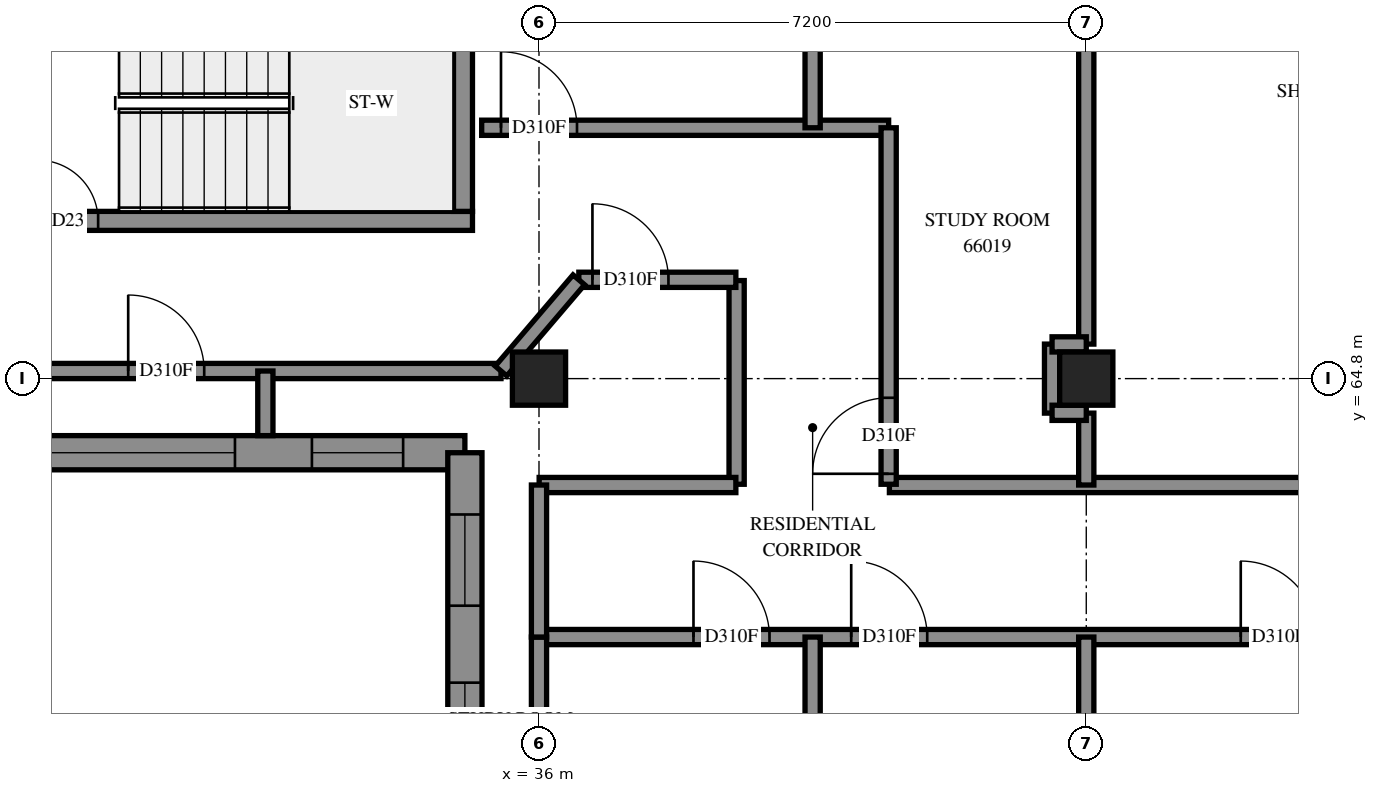
"""IFC4 building model, lengths in metres.
Left out: names, types, materials, properties, quantities, classifications, styles, units other than length and angle.
Written with IfcOpenShell. Run it as: python <this file> out.ifc"""

import sys

from ifc_helpers import new_model, si_unit, direction, frame, frame_2d, origin, origin_2d, place, context, subcontext, project, spatial, polyline, rectangle, outline, extrude, element, fill, save


model = new_model("IFC4")
c1 = context("Model", 3, precision=1e-05, world=origin(), true_north=direction((0.0, 1.0)))
c2 = subcontext(c1, "Body", "Model", "MODEL_VIEW")
j1 = project(units=[si_unit("LENGTHUNIT", "METRE"), si_unit("PLANEANGLEUNIT", "RADIAN")], contexts=[c1])
p1 = place(None, origin())
s1 = spatial("IfcSite", under=j1, at=p1, CompositionType="ELEMENT")
p2 = place(p1, origin())
s2 = spatial("IfcBuilding", under=s1, at=p2, CompositionType="ELEMENT")
p3 = place(p2, frame((0.0, 0.0, 243.8)))
s3 = spatial("IfcBuildingStorey", under=s2, at=p3, CompositionType="ELEMENT", Elevation=243.8)
for number, where, z_axis, x_axis in (
    (1, (36.0, 64.8, 0.0), (0.0, 0.0, 1.0), (1.0, 0.0, 0.0)),
    (2, (43.2, 64.8, 0.0), (0.0, 0.0, 1.0), (1.0, 0.0, 0.0)),
):
    element("IfcColumn", number, at=place(p3, frame(where, z_axis=z_axis, x_axis=x_axis)), inside=s3, PredefinedType="COLUMN", context=c2, shape_type="SweptSolid", body=[
        extrude(rectangle(XDim=0.7, YDim=0.7, at=origin_2d()), origin(), (0.0, 0.0, 1.0), 3.1),
    ])
p4 = place(p3, frame((26.925, 63.825, 0.0), z_axis=(0.0, 0.0, 1.0), x_axis=(1.0, 0.0, 0.0)))
e3 = element("IfcWall", 3, at=p4, inside=s3, PredefinedType="SOLIDWALL", context=c2, shape_type="SweptSolid", body=[
    extrude(outline(polyline([(-0.225, -0.225), (7.875, -0.225), (8.325, 0.225), (0.225, 0.225), (-0.225, -0.225)])), origin(), (0.0, 0.0, 1.0), 3.1),
])
p5 = place(p4, frame((2.275, 0.0, 0.45)))
e4 = element("IfcOpeningElement", 4, at=p5, cuts=e3, PredefinedType="OPENING", context=c2, shape_type="SweptSolid", body=[
    extrude(rectangle(XDim=2.8, YDim=2.55, at=frame_2d((1.4, 1.275))), frame((0.0, 0.235, 0.0), z_axis=(0.0, -1.0, 0.0), x_axis=(1.0, 0.0, 0.0)), (0.0, 0.0, 1.0), 0.47),
])
p6 = place(p4, frame((0.55, 0.0, 0.45)))
e5 = element("IfcOpeningElement", 5, at=p6, cuts=e3, PredefinedType="OPENING", context=c2, shape_type="SweptSolid", body=[
    extrude(rectangle(XDim=1.2, YDim=2.55, at=frame_2d((0.6, 1.275))), frame((0.0, 0.235, 0.0), z_axis=(0.0, -1.0, 0.0), x_axis=(1.0, 0.0, 0.0)), (0.0, 0.0, 1.0), 0.47),
])
p7 = place(p4, frame((6.088, 0.0, 0.45)))
e6 = element("IfcOpeningElement", 6, at=p7, cuts=e3, PredefinedType="OPENING", context=c2, shape_type="SweptSolid", body=[
    extrude(rectangle(XDim=1.2, YDim=2.55, at=frame_2d((0.6, 1.275))), frame((0.0, 0.235, 0.0), z_axis=(0.0, -1.0, 0.0), x_axis=(1.0, 0.0, 0.0)), (0.0, 0.0, 1.0), 0.47),
])
p8 = place(p3, frame((35.025, 63.825, 0.0), z_axis=(0.0, 0.0, 1.0), x_axis=(0.0, -1.0, 0.0)))
e7 = element("IfcWall", 7, at=p8, inside=s3, PredefinedType="SOLIDWALL", context=c2, shape_type="SweptSolid", body=[
    extrude(outline(polyline([(0.225, -0.225), (7.425, -0.225), (6.975, 0.225), (-0.225, 0.225), (0.225, -0.225)])), origin(), (0.0, 0.0, 1.0), 3.1),
])
p9 = place(p8, frame((3.025, 0.0, 0.45)))
e8 = element("IfcOpeningElement", 8, at=p9, cuts=e7, PredefinedType="OPENING", context=c2, shape_type="SweptSolid", body=[
    extrude(rectangle(XDim=2.8, YDim=2.55, at=frame_2d((1.4, 1.275))), frame((0.0, 0.235, 0.0), z_axis=(0.0, -1.0, 0.0), x_axis=(1.0, 0.0, 0.0)), (0.0, 0.0, 1.0), 0.47),
])
p10 = place(p8, frame((0.812, 0.0, 0.45)))
e9 = element("IfcOpeningElement", 9, at=p10, cuts=e7, PredefinedType="OPENING", context=c2, shape_type="SweptSolid", body=[
    extrude(rectangle(XDim=1.2, YDim=2.55, at=frame_2d((0.6, 1.275))), frame((0.0, 0.235, 0.0), z_axis=(0.0, -1.0, 0.0), x_axis=(1.0, 0.0, 0.0)), (0.0, 0.0, 1.0), 0.47),
])
p11 = place(p3, frame((28.875, 66.875, -0.3), z_axis=(0.0, 0.0, 1.0), x_axis=(1.0, 0.0, 0.0)))
e10 = element("IfcWall", 10, at=p11, inside=s3, PredefinedType="SOLIDWALL", context=c2, shape_type="SweptSolid", body=[
    extrude(rectangle(XDim=6.25, YDim=0.25, at=frame_2d((3.125, 0.0))), origin(), (0.0, 0.0, 1.0), 3.4),
])
p12 = place(p11, frame((0.525, 0.0, 0.3)))
e11 = element("IfcOpeningElement", 11, at=p12, cuts=e10, PredefinedType="OPENING", context=c2, shape_type="SweptSolid", body=[
    extrude(rectangle(XDim=0.8, YDim=2.1, at=frame_2d((0.4, 1.05))), frame((0.0, 0.135, 0.0), z_axis=(0.0, -1.0, 0.0), x_axis=(1.0, 0.0, 0.0)), (0.0, 0.0, 1.0), 0.27),
])
p13 = place(p3, frame((35.0, 67.0, -0.3), z_axis=(0.0, 0.0, 1.0), x_axis=(0.0, 1.0, 0.0)))
e12 = element("IfcWall", 12, at=p13, inside=s3, PredefinedType="SOLIDWALL", context=c2, shape_type="SweptSolid", body=[
    extrude(rectangle(XDim=2.85, YDim=0.25, at=frame_2d((1.425, 0.0))), origin(), (0.0, 0.0, 1.0), 3.4),
])
p14 = place(p3, frame((36.0, 61.4, 0.0), z_axis=(0.0, 0.0, 1.0), x_axis=(1.0, 0.0, 0.0)))
e13 = element("IfcWall", 13, at=p14, inside=s3, PredefinedType="PARTITIONING", context=c2, shape_type="SweptSolid", body=[
    extrude(rectangle(XDim=17.0, YDim=0.2, at=frame_2d((8.5, 0.0))), origin(), (0.0, 0.0, 1.0), 3.1),
])
p15 = place(p14, frame((2.033, 0.0, 0.0)))
e14 = element("IfcOpeningElement", 14, at=p15, cuts=e13, PredefinedType="OPENING", context=c2, shape_type="SweptSolid", body=[
    extrude(rectangle(XDim=1.0, YDim=2.1, at=frame_2d((0.5, 1.05))), frame((0.0, 0.11, 0.0), z_axis=(0.0, -1.0, 0.0), x_axis=(1.0, 0.0, 0.0)), (0.0, 0.0, 1.0), 0.22),
])
p16 = place(p14, frame((4.107, 0.0, 0.0)))
e15 = element("IfcOpeningElement", 15, at=p16, cuts=e13, PredefinedType="OPENING", context=c2, shape_type="SweptSolid", body=[
    extrude(rectangle(XDim=1.0, YDim=2.1, at=frame_2d((0.5, 1.05))), frame((0.0, 0.11, 0.0), z_axis=(0.0, -1.0, 0.0), x_axis=(1.0, 0.0, 0.0)), (0.0, 0.0, 1.0), 0.22),
])
p17 = place(p14, frame((9.232, 0.0, 0.0)))
e16 = element("IfcOpeningElement", 16, at=p17, cuts=e13, PredefinedType="OPENING", context=c2, shape_type="SweptSolid", body=[
    extrude(rectangle(XDim=1.0, YDim=2.1, at=frame_2d((0.5, 1.05))), frame((0.0, 0.11, 0.0), z_axis=(0.0, -1.0, 0.0), x_axis=(1.0, 0.0, 0.0)), (0.0, 0.0, 1.0), 0.22),
])
p18 = place(p14, frame((11.48, 0.0, 0.0)))
e17 = element("IfcOpeningElement", 17, at=p18, cuts=e13, PredefinedType="OPENING", context=c2, shape_type="SweptSolid", body=[
    extrude(rectangle(XDim=1.0, YDim=2.1, at=frame_2d((0.5, 1.05))), frame((0.0, 0.11, 0.0), z_axis=(0.0, -1.0, 0.0), x_axis=(1.0, 0.0, 0.0)), (0.0, 0.0, 1.0), 0.22),
])
p19 = place(p14, frame((15.805, 0.0, 0.0)))
e18 = element("IfcOpeningElement", 18, at=p19, cuts=e13, PredefinedType="OPENING", context=c2, shape_type="SweptSolid", body=[
    extrude(rectangle(XDim=1.0, YDim=2.1, at=frame_2d((0.5, 1.05))), frame((0.0, 0.11, 0.0), z_axis=(0.0, -1.0, 0.0), x_axis=(1.0, 0.0, 0.0)), (0.0, 0.0, 1.0), 0.22),
])
p20 = place(p3, frame((40.61, 63.4, 0.0), z_axis=(0.0, 0.0, 1.0), x_axis=(1.0, 0.0, 0.0)))
e19 = element("IfcWall", 19, at=p20, inside=s3, PredefinedType="PARTITIONING", context=c2, shape_type="SweptSolid", body=[
    extrude(rectangle(XDim=14.59, YDim=0.2, at=frame_2d((7.295, 0.0))), origin(), (0.0, 0.0, 1.0), 3.1),
])
p21 = place(p20, frame((6.3, 0.0, 0.0)))
e20 = element("IfcOpeningElement", 20, at=p21, cuts=e19, PredefinedType="OPENING", context=c2, shape_type="SweptSolid", body=[
    extrude(rectangle(XDim=1.0, YDim=2.1, at=frame_2d((0.5, 1.05))), frame((0.0, 0.11, 0.0), z_axis=(0.0, -1.0, 0.0), x_axis=(1.0, 0.0, 0.0)), (0.0, 0.0, 1.0), 0.22),
])
p22 = place(p20, frame((11.73, 0.0, 0.0)))
e21 = element("IfcOpeningElement", 21, at=p22, cuts=e19, PredefinedType="OPENING", context=c2, shape_type="SweptSolid", body=[
    extrude(rectangle(XDim=1.0, YDim=2.1, at=frame_2d((0.5, 1.05))), frame((0.0, 0.11, 0.0), z_axis=(0.0, -1.0, 0.0), x_axis=(1.0, 0.0, 0.0)), (0.0, 0.0, 1.0), 0.22),
])
p23 = place(p3, frame((29.15, 64.9, 0.0), z_axis=(0.0, 0.0, 1.0), x_axis=(1.0, 0.0, 0.0)))
e22 = element("IfcWall", 22, at=p23, inside=s3, PredefinedType="PARTITIONING", context=c2, shape_type="SweptSolid", body=[
    extrude(rectangle(XDim=6.35, YDim=0.2, at=frame_2d((3.175, 0.0))), origin(), (0.0, 0.0, 1.0), 2.6),
])
p24 = place(p23, frame((1.446, 0.0, 0.0)))
e23 = element("IfcOpeningElement", 23, at=p24, cuts=e22, PredefinedType="OPENING", context=c2, shape_type="SweptSolid", body=[
    extrude(rectangle(XDim=1.0, YDim=2.1, at=frame_2d((0.5, 1.05))), frame((0.0, 0.11, 0.0), z_axis=(0.0, -1.0, 0.0), x_axis=(1.0, 0.0, 0.0)), (0.0, 0.0, 1.0), 0.22),
])
p25 = place(p3, frame((43.2, 65.254, 0.0), z_axis=(0.0, 0.0, 1.0), x_axis=(0.0, 1.0, 0.0)))
e24 = element("IfcWall", 24, at=p25, inside=s3, PredefinedType="PARTITIONING", context=c2, shape_type="SweptSolid", body=[
    extrude(rectangle(XDim=6.292, YDim=0.2, at=frame_2d((3.146, 0.0))), origin(), (0.0, 0.0, 1.0), 3.1),
])
p26 = place(p3, frame((35.246, 68.1, 0.0), z_axis=(0.0, 0.0, 1.0), x_axis=(1.0, 0.0, 0.0)))
e25 = element("IfcWall", 25, at=p26, inside=s3, PredefinedType="PARTITIONING", context=c2, shape_type="SweptSolid", body=[
    extrude(rectangle(XDim=5.354, YDim=0.2, at=frame_2d((2.677, 0.0))), origin(), (0.0, 0.0, 1.0), 3.1),
])
p27 = place(p26, frame((0.254, 0.0, 0.0)))
e26 = element("IfcOpeningElement", 26, at=p27, cuts=e25, PredefinedType="OPENING", context=c2, shape_type="SweptSolid", body=[
    extrude(rectangle(XDim=1.0, YDim=2.1, at=frame_2d((0.5, 1.05))), frame((0.0, 0.11, 0.0), z_axis=(0.0, -1.0, 0.0), x_axis=(1.0, 0.0, 0.0)), (0.0, 0.0, 1.0), 0.22),
])
p28 = place(p3, frame((39.6, 68.1, 0.0), z_axis=(0.0, 0.0, 1.0), x_axis=(0.0, 1.0, 0.0)))
e27 = element("IfcWall", 27, at=p28, inside=s3, PredefinedType="PARTITIONING", context=c2, shape_type="SweptSolid", body=[
    extrude(rectangle(XDim=4.764, YDim=0.2, at=frame_2d((2.382, 0.0))), origin(), (0.0, 0.0, 1.0), 3.1),
])
p29 = place(p3, frame((40.6, 63.41, 0.0), z_axis=(0.0, 0.0, 1.0), x_axis=(0.0, 1.0, 0.0)))
e28 = element("IfcWall", 28, at=p29, inside=s3, PredefinedType="PARTITIONING", context=c2, shape_type="SweptSolid", body=[
    extrude(rectangle(XDim=4.69, YDim=0.2, at=frame_2d((2.345, 0.0))), origin(), (0.0, 0.0, 1.0), 3.1),
])
p30 = place(p29, frame((0.138, 0.0, 0.0)))
e29 = element("IfcOpeningElement", 29, at=p30, cuts=e28, PredefinedType="OPENING", context=c2, shape_type="SweptSolid", body=[
    extrude(rectangle(XDim=1.0, YDim=2.1, at=frame_2d((0.5, 1.05))), frame((0.0, 0.11, 0.0), z_axis=(0.0, -1.0, 0.0), x_axis=(1.0, 0.0, 0.0)), (0.0, 0.0, 1.0), 0.22),
])
p31 = place(p3, frame((39.6, 56.85, 0.0), z_axis=(0.0, 0.0, 1.0), x_axis=(0.0, 1.0, 0.0)))
e30 = element("IfcWall", 30, at=p31, inside=s3, PredefinedType="PARTITIONING", context=c2, shape_type="SweptSolid", body=[
    extrude(rectangle(XDim=4.55, YDim=0.2, at=frame_2d((2.275, 0.0))), origin(), (0.0, 0.0, 1.0), 3.1),
])
p32 = place(p3, frame((36.0, 57.95, 0.0), z_axis=(0.0, 0.0, 1.0), x_axis=(0.0, 1.0, 0.0)))
e31 = element("IfcWall", 31, at=p32, inside=s3, PredefinedType="PARTITIONING", context=c2, shape_type="SweptSolid", body=[
    extrude(rectangle(XDim=3.45, YDim=0.2, at=frame_2d((1.725, 0.0))), origin(), (0.0, 0.0, 1.0), 2.6),
])
p33 = place(p3, frame((43.2, 57.95, 0.0), z_axis=(0.0, 0.0, 1.0), x_axis=(0.0, 1.0, 0.0)))
e32 = element("IfcWall", 32, at=p33, inside=s3, PredefinedType="PARTITIONING", context=c2, shape_type="SweptSolid", body=[
    extrude(rectangle(XDim=3.45, YDim=0.2, at=frame_2d((1.725, 0.0))), origin(), (0.0, 0.0, 1.0), 3.1),
])
p34 = place(p3, frame((38.6, 63.41, 0.0), z_axis=(0.0, 0.0, 1.0), x_axis=(0.0, 1.0, 0.0)))
e33 = element("IfcWall", 33, at=p34, inside=s3, PredefinedType="PARTITIONING", context=c2, shape_type="SweptSolid", body=[
    extrude(rectangle(XDim=2.68, YDim=0.2, at=frame_2d((1.34, 0.0))), origin(), (0.0, 0.0, 1.0), 3.1),
])
p35 = place(p3, frame((36.002, 63.4, 0.0), z_axis=(0.0, 0.0, 1.0), x_axis=(1.0, 0.0, 0.0)))
e34 = element("IfcWall", 34, at=p35, inside=s3, PredefinedType="PARTITIONING", context=c2, shape_type="SweptSolid", body=[
    extrude(rectangle(XDim=2.588, YDim=0.2, at=frame_2d((1.294, 0.0))), origin(), (0.0, 0.0, 1.0), 3.1),
])
p36 = place(p3, frame((36.524, 66.1, 0.0), z_axis=(0.0, 0.0, 1.0), x_axis=(1.0, 0.0, 0.0)))
e35 = element("IfcWall", 35, at=p36, inside=s3, PredefinedType="PARTITIONING", context=c2, shape_type="SweptSolid", body=[
    extrude(rectangle(XDim=2.066, YDim=0.2, at=frame_2d((1.033, 0.0))), origin(), (0.0, 0.0, 1.0), 3.1),
])
p37 = place(p36, frame((0.179, 0.0, 0.0)))
e36 = element("IfcOpeningElement", 36, at=p37, cuts=e35, PredefinedType="OPENING", context=c2, shape_type="SweptSolid", body=[
    extrude(rectangle(XDim=1.0, YDim=2.1, at=frame_2d((0.5, 1.05))), frame((0.0, 0.11, 0.0), z_axis=(0.0, -1.0, 0.0), x_axis=(1.0, 0.0, 0.0)), (0.0, 0.0, 1.0), 0.22),
])
p38 = place(p3, frame((36.0, 61.4, 0.0), z_axis=(0.0, 0.0, 1.0), x_axis=(0.0, 1.0, 0.0)))
e37 = element("IfcWall", 37, at=p38, inside=s3, PredefinedType="PARTITIONING", context=c2, shape_type="SweptSolid", body=[
    extrude(rectangle(XDim=2.0, YDim=0.2, at=frame_2d((1.0, 0.0))), origin(), (0.0, 0.0, 1.0), 2.6),
])
p39 = place(p3, frame((43.2, 63.4, 0.0), z_axis=(0.0, 0.0, 1.0), x_axis=(0.0, 1.0, 0.0)))
e38 = element("IfcWall", 38, at=p39, inside=s3, PredefinedType="PARTITIONING", context=c2, shape_type="SweptSolid", body=[
    extrude(rectangle(XDim=0.946, YDim=0.2, at=frame_2d((0.473, 0.0))), origin(), (0.0, 0.0, 1.0), 3.1),
])
p40 = place(p3, frame((42.75, 64.346, 0.0), z_axis=(0.0, 0.0, 1.0), x_axis=(0.0, 1.0, 0.0)))
e39 = element("IfcWall", 39, at=p40, inside=s3, PredefinedType="PARTITIONING", context=c2, shape_type="SweptSolid", body=[
    extrude(rectangle(XDim=0.908, YDim=0.2, at=frame_2d((0.454, 0.0))), origin(), (0.0, 0.0, 1.0), 3.1),
])
p41 = place(p3, frame((32.4, 64.05, 0.0), z_axis=(0.0, 0.0, 1.0), x_axis=(0.0, 1.0, 0.0)))
e40 = element("IfcWall", 40, at=p41, inside=s3, PredefinedType="PARTITIONING", context=c2, shape_type="SweptSolid", body=[
    extrude(rectangle(XDim=0.85, YDim=0.2, at=frame_2d((0.425, 0.0))), origin(), (0.0, 0.0, 1.0), 3.1),
])
for number, where, z_axis, x_axis in (
    (41, (42.75, 65.25, 0.0), (0.0, 0.0, 1.0), (1.0, 0.0, 0.0)),
    (42, (42.75, 64.35, 0.0), (0.0, 0.0, 1.0), (1.0, 0.0, 0.0)),
):
    element("IfcWall", number, at=place(p3, frame(where, z_axis=z_axis, x_axis=x_axis)), inside=s3, PredefinedType="PARTITIONING", context=c2, shape_type="SweptSolid", body=[
        extrude(rectangle(XDim=0.45, YDim=0.2, at=frame_2d((0.225, 0.0))), origin(), (0.0, 0.0, 1.0), 3.1),
    ])
p42 = place(p3, frame((35.5, 64.9, 0.0), z_axis=(0.0, 0.0, 1.0), x_axis=(0.6491192707, 0.7606866453, 0.0)))
e43 = element("IfcWall", 43, at=p42, inside=s3, PredefinedType="PARTITIONING", context=c2, shape_type="SweptSolid", body=[
    extrude(rectangle(XDim=1.577, YDim=0.2, at=frame_2d((0.789, 0.0))), origin(), (0.0, 0.0, 1.0), 3.1),
])
p43 = place(p5, origin())
e44 = element("IfcWindow", 44, at=p43, inside=s3, PartitioningType="SINGLE_PANEL", PredefinedType="WINDOW", context=c2, shape_type="SweptSolid", body=[
    extrude(rectangle(XDim=2.8, YDim=2.55, at=frame_2d((1.4, 1.275))), frame((0.0, 0.205, 0.0), z_axis=(0.0, -1.0, 0.0), x_axis=(1.0, 0.0, 0.0)), (0.0, 0.0, 1.0), 0.06),
])
fill(e4, e44)
p44 = place(p7, origin())
e45 = element("IfcWindow", 45, at=p44, inside=s3, PartitioningType="SINGLE_PANEL", PredefinedType="WINDOW", context=c2, shape_type="SweptSolid", body=[
    extrude(rectangle(XDim=1.2, YDim=2.55, at=frame_2d((0.6, 1.275))), frame((0.0, 0.205, 0.0), z_axis=(0.0, -1.0, 0.0), x_axis=(1.0, 0.0, 0.0)), (0.0, 0.0, 1.0), 0.06),
])
fill(e6, e45)
p45 = place(p9, origin())
e46 = element("IfcWindow", 46, at=p45, inside=s3, PartitioningType="SINGLE_PANEL", PredefinedType="WINDOW", context=c2, shape_type="SweptSolid", body=[
    extrude(rectangle(XDim=2.8, YDim=2.55, at=frame_2d((1.4, 1.275))), frame((0.0, 0.205, 0.0), z_axis=(0.0, -1.0, 0.0), x_axis=(1.0, 0.0, 0.0)), (0.0, 0.0, 1.0), 0.06),
])
fill(e8, e46)
p46 = place(p10, origin())
e47 = element("IfcWindow", 47, at=p46, inside=s3, PartitioningType="SINGLE_PANEL", PredefinedType="WINDOW", context=c2, shape_type="SweptSolid", body=[
    extrude(rectangle(XDim=1.2, YDim=2.55, at=frame_2d((0.6, 1.275))), frame((0.0, 0.205, 0.0), z_axis=(0.0, -1.0, 0.0), x_axis=(1.0, 0.0, 0.0)), (0.0, 0.0, 1.0), 0.06),
])
fill(e9, e47)
p47 = place(p12, origin())
e48 = element("IfcDoor", 48, at=p47, inside=s3, OperationType="SINGLE_SWING_LEFT", PredefinedType="DOOR", context=c2, shape_type="SweptSolid", body=[
    extrude(rectangle(XDim=0.8, YDim=2.1, at=frame_2d((0.4, 1.05))), frame((0.0, 0.025, 0.0), z_axis=(0.0, -1.0, 0.0), x_axis=(1.0, 0.0, 0.0)), (0.0, 0.0, 1.0), 0.05),
])
fill(e11, e48)
p48 = place(p24, origin())
e49 = element("IfcDoor", 49, at=p48, inside=s3, OperationType="SINGLE_SWING_RIGHT", PredefinedType="DOOR", context=c2, shape_type="SweptSolid", body=[
    extrude(rectangle(XDim=1.0, YDim=2.1, at=frame_2d((0.5, 1.05))), frame((0.0, 0.025, 0.0), z_axis=(0.0, -1.0, 0.0), x_axis=(1.0, 0.0, 0.0)), (0.0, 0.0, 1.0), 0.05),
])
fill(e23, e49)
p49 = place(p37, origin())
e50 = element("IfcDoor", 50, at=p49, inside=s3, OperationType="SINGLE_SWING_RIGHT", PredefinedType="DOOR", context=c2, shape_type="SweptSolid", body=[
    extrude(rectangle(XDim=1.0, YDim=2.1, at=frame_2d((0.5, 1.05))), frame((0.0, 0.025, 0.0), z_axis=(0.0, -1.0, 0.0), x_axis=(1.0, 0.0, 0.0)), (0.0, 0.0, 1.0), 0.05),
])
fill(e36, e50)
p50 = place(p27, origin())
e51 = element("IfcDoor", 51, at=p50, inside=s3, OperationType="SINGLE_SWING_LEFT", PredefinedType="DOOR", context=c2, shape_type="SweptSolid", body=[
    extrude(rectangle(XDim=1.0, YDim=2.1, at=frame_2d((0.5, 1.05))), frame((0.0, 0.025, 0.0), z_axis=(0.0, -1.0, 0.0), x_axis=(1.0, 0.0, 0.0)), (0.0, 0.0, 1.0), 0.05),
])
fill(e26, e51)
p51 = place(p15, origin())
e52 = element("IfcDoor", 52, at=p51, inside=s3, OperationType="SINGLE_SWING_LEFT", PredefinedType="DOOR", context=c2, shape_type="SweptSolid", body=[
    extrude(rectangle(XDim=1.0, YDim=2.1, at=frame_2d((0.5, 1.05))), frame((0.0, 0.025, 0.0), z_axis=(0.0, -1.0, 0.0), x_axis=(1.0, 0.0, 0.0)), (0.0, 0.0, 1.0), 0.05),
])
fill(e14, e52)
p52 = place(p30, origin())
e53 = element("IfcDoor", 53, at=p52, inside=s3, OperationType="SINGLE_SWING_LEFT", PredefinedType="DOOR", context=c2, shape_type="SweptSolid", body=[
    extrude(rectangle(XDim=1.0, YDim=2.1, at=frame_2d((0.5, 1.05))), frame((0.0, 0.025, 0.0), z_axis=(0.0, -1.0, 0.0), x_axis=(1.0, 0.0, 0.0)), (0.0, 0.0, 1.0), 0.05),
])
fill(e29, e53)
p53 = place(p16, origin())
e54 = element("IfcDoor", 54, at=p53, inside=s3, OperationType="SINGLE_SWING_RIGHT", PredefinedType="DOOR", context=c2, shape_type="SweptSolid", body=[
    extrude(rectangle(XDim=1.0, YDim=2.1, at=frame_2d((0.5, 1.05))), frame((0.0, 0.025, 0.0), z_axis=(0.0, -1.0, 0.0), x_axis=(1.0, 0.0, 0.0)), (0.0, 0.0, 1.0), 0.05),
])
fill(e15, e54)
p54 = place(p17, origin())
e55 = element("IfcDoor", 55, at=p54, inside=s3, OperationType="SINGLE_SWING_LEFT", PredefinedType="DOOR", context=c2, shape_type="SweptSolid", body=[
    extrude(rectangle(XDim=1.0, YDim=2.1, at=frame_2d((0.5, 1.05))), frame((0.0, 0.025, 0.0), z_axis=(0.0, -1.0, 0.0), x_axis=(1.0, 0.0, 0.0)), (0.0, 0.0, 1.0), 0.05),
])
fill(e16, e55)
save(model, sys.argv[1])
